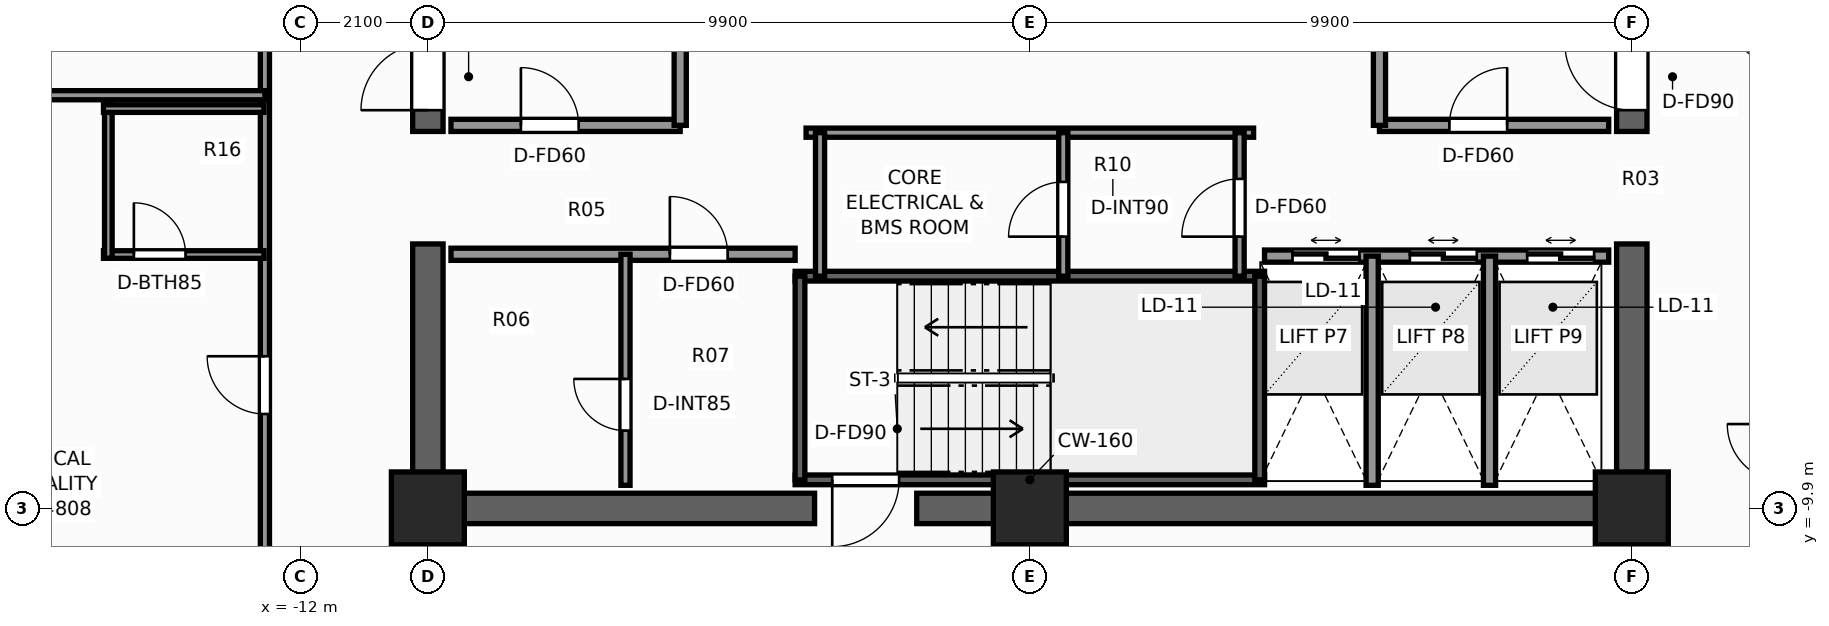
"""IFC4 building model, lengths in metres.
Left out: names, types, materials, properties, quantities, classifications, styles, units other than length and angle.
Written with IfcOpenShell. Run it as: python <this file> out.ifc"""

import sys

from ifc_helpers import new_model, si_unit, direction, frame, frame_2d, origin, origin_2d, place, context, subcontext, project, spatial, rectangle, extrude, element, fill, save


model = new_model("IFC4")
c1 = context("Model", 3, precision=1e-05, world=origin(), true_north=direction((0.0, 1.0)))
c2 = subcontext(c1, "Body", "Model", "MODEL_VIEW")
j1 = project(units=[si_unit("LENGTHUNIT", "METRE"), si_unit("PLANEANGLEUNIT", "RADIAN")], contexts=[c1])
p1 = place(None, origin())
s1 = spatial("IfcSite", under=j1, at=p1, CompositionType="ELEMENT")
p2 = place(p1, origin())
s2 = spatial("IfcBuilding", under=s1, at=p2, CompositionType="ELEMENT")
p3 = place(p2, frame((0.0, 0.0, 166.8)))
s3 = spatial("IfcBuildingStorey", under=s2, at=p3, CompositionType="ELEMENT", Elevation=166.8)
p4 = place(p3, frame((10.15, -9.9, 0.0), z_axis=(0.0, 0.0, 1.0), x_axis=(-1.0, 0.0, 0.0)))
e1 = element("IfcWall", 1, at=p4, inside=s3, PredefinedType="SHEAR", context=c2, shape_type="SweptSolid", body=[
    extrude(rectangle(XDim=12.01, YDim=0.5, at=frame_2d((6.005, 0.0))), origin(), (0.0, 0.0, 1.0), 3.3),
])
p5 = place(p3, frame((-3.54, -9.9, 0.0), z_axis=(0.0, 0.0, 1.0), x_axis=(-1.0, 0.0, 0.0)))
e2 = element("IfcWall", 2, at=p5, inside=s3, PredefinedType="SHEAR", context=c2, shape_type="SweptSolid", body=[
    extrude(rectangle(XDim=6.61, YDim=0.5, at=frame_2d((3.305, 0.0))), origin(), (0.0, 0.0, 1.0), 3.3),
])
for number, where, z_axis, x_axis in (
    (3, (-9.9, -9.65, 0.0), (0.0, 0.0, 1.0), (0.0, 1.0, 0.0)),
    (4, (9.9, -9.65, 0.0), (0.0, 0.0, 1.0), (0.0, 1.0, 0.0)),
):
    element("IfcWall", number, at=place(p3, frame(where, z_axis=z_axis, x_axis=x_axis)), inside=s3, PredefinedType="SHEAR", context=c2, shape_type="SweptSolid", body=[
        extrude(rectangle(XDim=4.1, YDim=0.5, at=frame_2d((2.05, 0.0))), origin(), (0.0, 0.0, 1.0), 3.3),
    ])
p6 = place(p3, frame((-9.9, -3.7, 0.0), z_axis=(0.0, 0.0, 1.0), x_axis=(0.0, 1.0, 0.0)))
e5 = element("IfcWall", 5, at=p6, inside=s3, PredefinedType="SHEAR", context=c2, shape_type="SweptSolid", body=[
    extrude(rectangle(XDim=13.35, YDim=0.5, at=frame_2d((6.675, 0.0))), origin(), (0.0, 0.0, 1.0), 3.3),
])
p7 = place(p6, frame((0.35, 0.0, 0.0)))
e6 = element("IfcOpeningElement", 6, at=p7, cuts=e5, PredefinedType="OPENING", context=c2, shape_type="SweptSolid", body=[
    extrude(rectangle(XDim=1.1, YDim=2.2, at=frame_2d((0.55, 1.1))), frame((0.0, 0.26, 0.0), z_axis=(0.0, -1.0, 0.0), x_axis=(1.0, 0.0, 0.0)), (0.0, 0.0, 1.0), 0.52),
])
p8 = place(p3, frame((9.9, -3.7, 0.0), z_axis=(0.0, 0.0, 1.0), x_axis=(0.0, 1.0, 0.0)))
e7 = element("IfcWall", 7, at=p8, inside=s3, PredefinedType="SHEAR", context=c2, shape_type="SweptSolid", body=[
    extrude(rectangle(XDim=13.35, YDim=0.5, at=frame_2d((6.675, 0.0))), origin(), (0.0, 0.0, 1.0), 3.3),
])
p9 = place(p8, frame((0.35, 0.0, 0.0)))
e8 = element("IfcOpeningElement", 8, at=p9, cuts=e7, PredefinedType="OPENING", context=c2, shape_type="SweptSolid", body=[
    extrude(rectangle(XDim=1.1, YDim=2.2, at=frame_2d((0.55, 1.1))), frame((0.0, 0.26, 0.0), z_axis=(0.0, -1.0, 0.0), x_axis=(1.0, 0.0, 0.0)), (0.0, 0.0, 1.0), 0.52),
])
for number, where, z_axis, x_axis in (
    (9, (-9.9, -9.9, 0.0), (0.0, 0.0, 1.0), (1.0, 0.0, 0.0)),
    (10, (9.9, -9.9, 0.0), (0.0, 0.0, 1.0), (1.0, 0.0, 0.0)),
    (11, (0.0, -9.9, 0.0), (0.0, 0.0, 1.0), (1.0, 0.0, 0.0)),
):
    element("IfcColumn", number, at=place(p3, frame(where, z_axis=z_axis, x_axis=x_axis)), inside=s3, PredefinedType="COLUMN", context=c2, shape_type="SweptSolid", body=[
        extrude(rectangle(XDim=1.2, YDim=1.2, at=origin_2d()), origin(), (0.0, 0.0, 1.0), 3.3),
    ])
p10 = place(p3, frame((3.86, -9.43, 0.0), z_axis=(0.0, 0.0, 1.0), x_axis=(-1.0, 0.0, 0.0)))
e12 = element("IfcWall", 12, at=p10, inside=s3, PredefinedType="SHEAR", context=c2, shape_type="SweptSolid", body=[
    extrude(rectangle(XDim=7.72, YDim=0.16, at=frame_2d((3.86, 0.0))), origin(), (0.0, 0.0, 1.0), 3.3),
])
p11 = place(p10, frame((6.01, 0.0, 0.0)))
e13 = element("IfcOpeningElement", 13, at=p11, cuts=e12, PredefinedType="OPENING", context=c2, shape_type="SweptSolid", body=[
    extrude(rectangle(XDim=1.1, YDim=2.2, at=frame_2d((0.55, 1.1))), frame((0.0, 0.09, 0.0), z_axis=(0.0, -1.0, 0.0), x_axis=(1.0, 0.0, 0.0)), (0.0, 0.0, 1.0), 0.18),
])
p12 = place(p3, frame((-3.86, -6.08, 0.0), z_axis=(0.0, 0.0, 1.0), x_axis=(1.0, 0.0, 0.0)))
e14 = element("IfcWall", 14, at=p12, inside=s3, PredefinedType="SHEAR", context=c2, shape_type="SweptSolid", body=[
    extrude(rectangle(XDim=7.72, YDim=0.16, at=frame_2d((3.86, 0.0))), origin(), (0.0, 0.0, 1.0), 3.3),
])
for number, where, z_axis, x_axis in (
    (15, (-3.78, -9.43, 0.0), (0.0, 0.0, 1.0), (0.0, 1.0, 0.0)),
    (16, (3.78, -9.43, 0.0), (0.0, 0.0, 1.0), (0.0, 1.0, 0.0)),
):
    element("IfcWall", number, at=place(p3, frame(where, z_axis=z_axis, x_axis=x_axis)), inside=s3, PredefinedType="SHEAR", context=c2, shape_type="SweptSolid", body=[
        extrude(rectangle(XDim=3.35, YDim=0.16, at=frame_2d((1.675, 0.0))), origin(), (0.0, 0.0, 1.0), 3.3),
    ])
p13 = place(p3, frame((-9.52, -3.6, 0.0), z_axis=(0.0, 0.0, 1.0), x_axis=(1.0, 0.0, 0.0)))
e17 = element("IfcWall", 17, at=p13, inside=s3, PredefinedType="SOLIDWALL", context=c2, shape_type="SweptSolid", body=[
    extrude(rectangle(XDim=3.77, YDim=0.2, at=frame_2d((1.885, 0.0))), origin(), (0.0, 0.0, 1.0), 3.1),
])
p14 = place(p13, frame((1.15, 0.0, 0.0)))
e18 = element("IfcOpeningElement", 18, at=p14, cuts=e17, PredefinedType="OPENING", context=c2, shape_type="SweptSolid", body=[
    extrude(rectangle(XDim=0.95, YDim=2.06, at=frame_2d((0.475, 1.03))), frame((0.0, 0.11, 0.0), z_axis=(0.0, -1.0, 0.0), x_axis=(1.0, 0.0, 0.0)), (0.0, 0.0, 1.0), 0.22),
])
p15 = place(p3, frame((-5.75, -3.6, 0.0), z_axis=(0.0, 0.0, 1.0), x_axis=(0.0, 1.0, 0.0)))
e19 = element("IfcWall", 19, at=p15, inside=s3, PredefinedType="SOLIDWALL", context=c2, shape_type="SweptSolid", body=[
    extrude(rectangle(XDim=5.57, YDim=0.2, at=frame_2d((2.785, 0.0))), origin(), (0.0, 0.0, 1.0), 2.735),
])
p16 = place(p15, frame((2.75, 0.0, 0.0)))
e20 = element("IfcOpeningElement", 20, at=p16, cuts=e19, PredefinedType="OPENING", context=c2, shape_type="SweptSolid", body=[
    extrude(rectangle(XDim=1.1, YDim=2.2, at=frame_2d((0.55, 1.1))), frame((0.0, 0.11, 0.0), z_axis=(0.0, -1.0, 0.0), x_axis=(1.0, 0.0, 0.0)), (0.0, 0.0, 1.0), 0.22),
])
p17 = place(p3, frame((5.75, -3.6, 0.0), z_axis=(0.0, 0.0, 1.0), x_axis=(1.0, 0.0, 0.0)))
e21 = element("IfcWall", 21, at=p17, inside=s3, PredefinedType="SOLIDWALL", context=c2, shape_type="SweptSolid", body=[
    extrude(rectangle(XDim=3.77, YDim=0.2, at=frame_2d((1.885, 0.0))), origin(), (0.0, 0.0, 1.0), 3.1),
])
p18 = place(p17, frame((1.15, 0.0, 0.0)))
e22 = element("IfcOpeningElement", 22, at=p18, cuts=e21, PredefinedType="OPENING", context=c2, shape_type="SweptSolid", body=[
    extrude(rectangle(XDim=0.95, YDim=2.06, at=frame_2d((0.475, 1.03))), frame((0.0, 0.11, 0.0), z_axis=(0.0, -1.0, 0.0), x_axis=(1.0, 0.0, 0.0)), (0.0, 0.0, 1.0), 0.22),
])
p19 = place(p3, frame((5.75, -3.6, 0.0), z_axis=(0.0, 0.0, 1.0), x_axis=(0.0, 1.0, 0.0)))
e23 = element("IfcWall", 23, at=p19, inside=s3, PredefinedType="SOLIDWALL", context=c2, shape_type="SweptSolid", body=[
    extrude(rectangle(XDim=5.57, YDim=0.2, at=frame_2d((2.785, 0.0))), origin(), (0.0, 0.0, 1.0), 2.735),
])
p20 = place(p19, frame((2.75, 0.0, 0.0)))
e24 = element("IfcOpeningElement", 24, at=p20, cuts=e23, PredefinedType="OPENING", context=c2, shape_type="SweptSolid", body=[
    extrude(rectangle(XDim=1.1, YDim=2.2, at=frame_2d((0.55, 1.1))), frame((0.0, 0.11, 0.0), z_axis=(0.0, -1.0, 0.0), x_axis=(1.0, 0.0, 0.0)), (0.0, 0.0, 1.0), 0.22),
])
p21 = place(p3, frame((-9.52, -5.72, 0.0), z_axis=(0.0, 0.0, 1.0), x_axis=(1.0, 0.0, 0.0)))
e25 = element("IfcWall", 25, at=p21, inside=s3, PredefinedType="SOLIDWALL", context=c2, shape_type="SweptSolid", body=[
    extrude(rectangle(XDim=5.66, YDim=0.2, at=frame_2d((2.83, 0.0))), origin(), (0.0, 0.0, 1.0), 3.1),
])
p22 = place(p21, frame((3.6, 0.0, 0.0)))
e26 = element("IfcOpeningElement", 26, at=p22, cuts=e25, PredefinedType="OPENING", context=c2, shape_type="SweptSolid", body=[
    extrude(rectangle(XDim=0.95, YDim=2.06, at=frame_2d((0.475, 1.03))), frame((0.0, 0.11, 0.0), z_axis=(0.0, -1.0, 0.0), x_axis=(1.0, 0.0, 0.0)), (0.0, 0.0, 1.0), 0.22),
])
p23 = place(p3, frame((-6.65, -9.52, 0.0), z_axis=(0.0, 0.0, 1.0), x_axis=(0.0, 1.0, 0.0)))
e27 = element("IfcWall", 27, at=p23, inside=s3, PredefinedType="PARTITIONING", context=c2, shape_type="SweptSolid", body=[
    extrude(rectangle(XDim=3.8, YDim=0.15, at=frame_2d((1.9, 0.0))), origin(), (0.0, 0.0, 1.0), 3.1),
])
p24 = place(p23, frame((0.9, 0.0, 0.0)))
e28 = element("IfcOpeningElement", 28, at=p24, cuts=e27, PredefinedType="OPENING", context=c2, shape_type="SweptSolid", body=[
    extrude(rectangle(XDim=0.85, YDim=2.03, at=frame_2d((0.425, 1.015))), frame((0.0, 0.085, 0.0), z_axis=(0.0, -1.0, 0.0), x_axis=(1.0, 0.0, 0.0)), (0.0, 0.0, 1.0), 0.17),
])
p25 = place(p3, frame((3.86, -5.75, 0.0), z_axis=(0.0, 0.0, 1.0), x_axis=(1.0, 0.0, 0.0)))
e29 = element("IfcWall", 29, at=p25, inside=s3, PredefinedType="SOLIDWALL", context=c2, shape_type="SweptSolid", body=[
    extrude(rectangle(XDim=5.66, YDim=0.2, at=frame_2d((2.83, 0.0))), origin(), (0.0, 0.0, 1.0), 3.1),
])
p26 = place(p25, frame((0.46, 0.0, 0.0)))
e30 = element("IfcOpeningElement", 30, at=p26, cuts=e29, PredefinedType="OPENING", context=c2, shape_type="SweptSolid", body=[
    extrude(rectangle(XDim=1.1, YDim=2.2, at=frame_2d((0.55, 1.1))), frame((0.0, 0.11, 0.0), z_axis=(0.0, -1.0, 0.0), x_axis=(1.0, 0.0, 0.0)), (0.0, 0.0, 1.0), 0.22),
])
p27 = place(p25, frame((2.39, 0.0, 0.0)))
e31 = element("IfcOpeningElement", 31, at=p27, cuts=e29, PredefinedType="OPENING", context=c2, shape_type="SweptSolid", body=[
    extrude(rectangle(XDim=1.1, YDim=2.2, at=frame_2d((0.55, 1.1))), frame((0.0, 0.11, 0.0), z_axis=(0.0, -1.0, 0.0), x_axis=(1.0, 0.0, 0.0)), (0.0, 0.0, 1.0), 0.22),
])
p28 = place(p25, frame((4.32, 0.0, 0.0)))
e32 = element("IfcOpeningElement", 32, at=p28, cuts=e29, PredefinedType="OPENING", context=c2, shape_type="SweptSolid", body=[
    extrude(rectangle(XDim=1.1, YDim=2.2, at=frame_2d((0.55, 1.1))), frame((0.0, 0.11, 0.0), z_axis=(0.0, -1.0, 0.0), x_axis=(1.0, 0.0, 0.0)), (0.0, 0.0, 1.0), 0.22),
])
for number, where, z_axis, x_axis in (
    (33, (5.63, -9.52, 0.0), (0.0, 0.0, 1.0), (0.0, 1.0, 0.0)),
    (34, (7.56, -9.52, 0.0), (0.0, 0.0, 1.0), (0.0, 1.0, 0.0)),
):
    element("IfcWall", number, at=place(p3, frame(where, z_axis=z_axis, x_axis=x_axis)), inside=s3, PredefinedType="SOLIDWALL", context=c2, shape_type="SweptSolid", body=[
        extrude(rectangle(XDim=3.77, YDim=0.2, at=frame_2d((1.885, 0.0))), origin(), (0.0, 0.0, 1.0), 3.1),
    ])
p29 = place(p3, frame((-3.68, -3.72, 0.0), z_axis=(0.0, 0.0, 1.0), x_axis=(1.0, 0.0, 0.0)))
e35 = element("IfcWall", 35, at=p29, inside=s3, PredefinedType="PARTITIONING", context=c2, shape_type="SweptSolid", body=[
    extrude(rectangle(XDim=7.36, YDim=0.15, at=frame_2d((3.68, 0.0))), origin(), (0.0, 0.0, 1.0), 3.1),
])
p30 = place(p3, frame((3.45, -6.08, 0.0), z_axis=(0.0, 0.0, 1.0), x_axis=(0.0, 1.0, 0.0)))
e36 = element("IfcWall", 36, at=p30, inside=s3, PredefinedType="PARTITIONING", context=c2, shape_type="SweptSolid", body=[
    extrude(rectangle(XDim=2.36, YDim=0.15, at=frame_2d((1.18, 0.0))), origin(), (0.0, 0.0, 1.0), 3.1),
])
p31 = place(p30, frame((0.65, 0.0, 0.0)))
e37 = element("IfcOpeningElement", 37, at=p31, cuts=e36, PredefinedType="OPENING", context=c2, shape_type="SweptSolid", body=[
    extrude(rectangle(XDim=0.95, YDim=2.06, at=frame_2d((0.475, 1.03))), frame((0.0, 0.085, 0.0), z_axis=(0.0, -1.0, 0.0), x_axis=(1.0, 0.0, 0.0)), (0.0, 0.0, 1.0), 0.17),
])
p32 = place(p3, frame((-3.45, -6.08, 0.0), z_axis=(0.0, 0.0, 1.0), x_axis=(0.0, 1.0, 0.0)))
e38 = element("IfcWall", 38, at=p32, inside=s3, PredefinedType="PARTITIONING", context=c2, shape_type="SweptSolid", body=[
    extrude(rectangle(XDim=2.36, YDim=0.15, at=frame_2d((1.18, 0.0))), origin(), (0.0, 0.0, 1.0), 3.1),
])
p33 = place(p3, frame((0.55, -6.08, 0.0), z_axis=(0.0, 0.0, 1.0), x_axis=(0.0, 1.0, 0.0)))
e39 = element("IfcWall", 39, at=p33, inside=s3, PredefinedType="PARTITIONING", context=c2, shape_type="SweptSolid", body=[
    extrude(rectangle(XDim=2.36, YDim=0.15, at=frame_2d((1.18, 0.0))), origin(), (0.0, 0.0, 1.0), 3.1),
])
p34 = place(p33, frame((0.65, 0.0, 0.0)))
e40 = element("IfcOpeningElement", 40, at=p34, cuts=e39, PredefinedType="OPENING", context=c2, shape_type="SweptSolid", body=[
    extrude(rectangle(XDim=0.9, YDim=2.06, at=frame_2d((0.45, 1.03))), frame((0.0, 0.085, 0.0), z_axis=(0.0, -1.0, 0.0), x_axis=(1.0, 0.0, 0.0)), (0.0, 0.0, 1.0), 0.17),
])
p35 = place(p3, frame((-12.58, -12.26, 0.0), z_axis=(0.0, 0.0, 1.0), x_axis=(0.0, 1.0, 0.0)))
e41 = element("IfcWall", 41, at=p35, inside=s3, PredefinedType="PARTITIONING", context=c2, shape_type="SweptSolid", body=[
    extrude(rectangle(XDim=24.84, YDim=0.15, at=frame_2d((12.42, 0.0))), origin(), (0.0, 0.0, 1.0), 2.389),
])
p36 = place(p35, frame((3.913, 0.0, 0.0)))
e42 = element("IfcOpeningElement", 42, at=p36, cuts=e41, PredefinedType="OPENING", context=c2, shape_type="SweptSolid", body=[
    extrude(rectangle(XDim=0.95, YDim=2.06, at=frame_2d((0.475, 1.03))), frame((0.0, 0.085, 0.0), z_axis=(0.0, -1.0, 0.0), x_axis=(1.0, 0.0, 0.0)), (0.0, 0.0, 1.0), 0.17),
])
p37 = place(p35, frame((19.345, 0.0, 0.0)))
e43 = element("IfcOpeningElement", 43, at=p37, cuts=e41, PredefinedType="OPENING", context=c2, shape_type="SweptSolid", body=[
    extrude(rectangle(XDim=0.9, YDim=2.06, at=frame_2d((0.45, 1.03))), frame((0.0, 0.085, 0.0), z_axis=(0.0, -1.0, 0.0), x_axis=(1.0, 0.0, 0.0)), (0.0, 0.0, 1.0), 0.17),
])
p38 = place(p3, frame((-19.08, -3.104, 0.0), z_axis=(0.0, 0.0, 1.0), x_axis=(1.0, 0.0, 0.0)))
e44 = element("IfcWall", 44, at=p38, inside=s3, PredefinedType="PARTITIONING", context=c2, shape_type="SweptSolid", body=[
    extrude(rectangle(XDim=6.5, YDim=0.15, at=frame_2d((3.25, 0.0))), origin(), (0.0, 0.0, 1.0), 2.473),
])
p39 = place(p3, frame((-15.235, -5.724, 0.0), z_axis=(0.0, 0.0, 1.0), x_axis=(1.0, 0.0, 0.0)))
e45 = element("IfcWall", 45, at=p39, inside=s3, PredefinedType="PARTITIONING", context=c2, shape_type="SweptSolid", body=[
    extrude(rectangle(XDim=2.64, YDim=0.125, at=frame_2d((1.32, 0.0))), origin(), (0.0, 0.0, 1.0), 3.1),
])
p40 = place(p39, frame((0.5, 0.0, 0.0)))
e46 = element("IfcOpeningElement", 46, at=p40, cuts=e45, PredefinedType="OPENING", context=c2, shape_type="SweptSolid", body=[
    extrude(rectangle(XDim=0.85, YDim=2.03, at=frame_2d((0.425, 1.015))), frame((0.0, 0.073, 0.0), z_axis=(0.0, -1.0, 0.0), x_axis=(1.0, 0.0, 0.0)), (0.0, 0.0, 1.0), 0.145),
])
p41 = place(p3, frame((-15.155, -5.784, 0.0), z_axis=(0.0, 0.0, 1.0), x_axis=(0.0, 1.0, 0.0)))
e47 = element("IfcWall", 47, at=p41, inside=s3, PredefinedType="PARTITIONING", context=c2, shape_type="SweptSolid", body=[
    extrude(rectangle(XDim=2.52, YDim=0.125, at=frame_2d((1.26, 0.0))), origin(), (0.0, 0.0, 1.0), 2.389),
])
p42 = place(p3, frame((-15.235, -3.324, 0.0), z_axis=(0.0, 0.0, 1.0), x_axis=(1.0, 0.0, 0.0)))
e48 = element("IfcWall", 48, at=p42, inside=s3, PredefinedType="PARTITIONING", context=c2, shape_type="SweptSolid", body=[
    extrude(rectangle(XDim=2.64, YDim=0.125, at=frame_2d((1.32, 0.0))), origin(), (0.0, 0.0, 1.0), 3.1),
])
p43 = place(p11, origin())
e49 = element("IfcDoor", 49, at=p43, inside=s3, OperationType="SINGLE_SWING_RIGHT", PredefinedType="DOOR", context=c2, shape_type="SweptSolid", body=[
    extrude(rectangle(XDim=1.1, YDim=2.2, at=frame_2d((0.55, 1.1))), frame((0.0, 0.025, 0.0), z_axis=(0.0, -1.0, 0.0), x_axis=(1.0, 0.0, 0.0)), (0.0, 0.0, 1.0), 0.05),
])
fill(e13, e49)
p44 = place(p7, origin())
e50 = element("IfcDoor", 50, at=p44, inside=s3, OperationType="SINGLE_SWING_LEFT", PredefinedType="DOOR", context=c2, shape_type="SweptSolid", body=[
    extrude(rectangle(XDim=1.1, YDim=2.2, at=frame_2d((0.55, 1.1))), frame((0.0, 0.025, 0.0), z_axis=(0.0, -1.0, 0.0), x_axis=(1.0, 0.0, 0.0)), (0.0, 0.0, 1.0), 0.05),
])
fill(e6, e50)
p45 = place(p9, origin())
e51 = element("IfcDoor", 51, at=p45, inside=s3, OperationType="SINGLE_SWING_RIGHT", PredefinedType="DOOR", context=c2, shape_type="SweptSolid", body=[
    extrude(rectangle(XDim=1.1, YDim=2.2, at=frame_2d((0.55, 1.1))), frame((0.0, 0.025, 0.0), z_axis=(0.0, -1.0, 0.0), x_axis=(1.0, 0.0, 0.0)), (0.0, 0.0, 1.0), 0.05),
])
fill(e8, e51)
p46 = place(p22, origin())
e52 = element("IfcDoor", 52, at=p46, inside=s3, OperationType="SINGLE_SWING_LEFT", PredefinedType="DOOR", context=c2, shape_type="SweptSolid", body=[
    extrude(rectangle(XDim=0.95, YDim=2.06, at=frame_2d((0.475, 1.03))), frame((0.0, 0.025, 0.0), z_axis=(0.0, -1.0, 0.0), x_axis=(1.0, 0.0, 0.0)), (0.0, 0.0, 1.0), 0.05),
])
fill(e26, e52)
p47 = place(p24, origin())
e53 = element("IfcDoor", 53, at=p47, inside=s3, OperationType="SINGLE_SWING_RIGHT", PredefinedType="DOOR", context=c2, shape_type="SweptSolid", body=[
    extrude(rectangle(XDim=0.85, YDim=2.03, at=frame_2d((0.425, 1.015))), frame((0.0, 0.025, 0.0), z_axis=(0.0, -1.0, 0.0), x_axis=(1.0, 0.0, 0.0)), (0.0, 0.0, 1.0), 0.05),
])
fill(e28, e53)
p48 = place(p14, origin())
e54 = element("IfcDoor", 54, at=p48, inside=s3, OperationType="SINGLE_SWING_LEFT", PredefinedType="DOOR", context=c2, shape_type="SweptSolid", body=[
    extrude(rectangle(XDim=0.95, YDim=2.06, at=frame_2d((0.475, 1.03))), frame((0.0, 0.025, 0.0), z_axis=(0.0, -1.0, 0.0), x_axis=(1.0, 0.0, 0.0)), (0.0, 0.0, 1.0), 0.05),
])
fill(e18, e54)
p49 = place(p26, origin())
e55 = element("IfcDoor", 55, at=p49, inside=s3, OperationType="DOUBLE_DOOR_SLIDING", PredefinedType="DOOR", context=c2, shape_type="SweptSolid", body=[
    extrude(rectangle(XDim=1.1, YDim=2.2, at=frame_2d((0.55, 1.1))), frame((0.0, 0.025, 0.0), z_axis=(0.0, -1.0, 0.0), x_axis=(1.0, 0.0, 0.0)), (0.0, 0.0, 1.0), 0.05),
])
fill(e30, e55)
p50 = place(p27, origin())
e56 = element("IfcDoor", 56, at=p50, inside=s3, OperationType="DOUBLE_DOOR_SLIDING", PredefinedType="DOOR", context=c2, shape_type="SweptSolid", body=[
    extrude(rectangle(XDim=1.1, YDim=2.2, at=frame_2d((0.55, 1.1))), frame((0.0, 0.025, 0.0), z_axis=(0.0, -1.0, 0.0), x_axis=(1.0, 0.0, 0.0)), (0.0, 0.0, 1.0), 0.05),
])
fill(e31, e56)
p51 = place(p28, origin())
e57 = element("IfcDoor", 57, at=p51, inside=s3, OperationType="DOUBLE_DOOR_SLIDING", PredefinedType="DOOR", context=c2, shape_type="SweptSolid", body=[
    extrude(rectangle(XDim=1.1, YDim=2.2, at=frame_2d((0.55, 1.1))), frame((0.0, 0.025, 0.0), z_axis=(0.0, -1.0, 0.0), x_axis=(1.0, 0.0, 0.0)), (0.0, 0.0, 1.0), 0.05),
])
fill(e32, e57)
p52 = place(p18, origin())
e58 = element("IfcDoor", 58, at=p52, inside=s3, OperationType="SINGLE_SWING_RIGHT", PredefinedType="DOOR", context=c2, shape_type="SweptSolid", body=[
    extrude(rectangle(XDim=0.95, YDim=2.06, at=frame_2d((0.475, 1.03))), frame((0.0, 0.025, 0.0), z_axis=(0.0, -1.0, 0.0), x_axis=(1.0, 0.0, 0.0)), (0.0, 0.0, 1.0), 0.05),
])
fill(e22, e58)
p53 = place(p31, origin())
e59 = element("IfcDoor", 59, at=p53, inside=s3, OperationType="SINGLE_SWING_LEFT", PredefinedType="DOOR", context=c2, shape_type="SweptSolid", body=[
    extrude(rectangle(XDim=0.95, YDim=2.06, at=frame_2d((0.475, 1.03))), frame((0.0, 0.025, 0.0), z_axis=(0.0, -1.0, 0.0), x_axis=(1.0, 0.0, 0.0)), (0.0, 0.0, 1.0), 0.05),
])
fill(e37, e59)
p54 = place(p34, origin())
e60 = element("IfcDoor", 60, at=p54, inside=s3, OperationType="SINGLE_SWING_LEFT", PredefinedType="DOOR", context=c2, shape_type="SweptSolid", body=[
    extrude(rectangle(XDim=0.9, YDim=2.06, at=frame_2d((0.45, 1.03))), frame((0.0, 0.025, 0.0), z_axis=(0.0, -1.0, 0.0), x_axis=(1.0, 0.0, 0.0)), (0.0, 0.0, 1.0), 0.05),
])
fill(e40, e60)
p55 = place(p40, origin())
e61 = element("IfcDoor", 61, at=p55, inside=s3, OperationType="SINGLE_SWING_LEFT", PredefinedType="DOOR", context=c2, shape_type="SweptSolid", body=[
    extrude(rectangle(XDim=0.85, YDim=2.03, at=frame_2d((0.425, 1.015))), frame((0.0, 0.025, 0.0), z_axis=(0.0, -1.0, 0.0), x_axis=(1.0, 0.0, 0.0)), (0.0, 0.0, 1.0), 0.05),
])
fill(e46, e61)
p56 = place(p36, origin())
e62 = element("IfcDoor", 62, at=p56, inside=s3, OperationType="SINGLE_SWING_RIGHT", PredefinedType="DOOR", context=c2, shape_type="SweptSolid", body=[
    extrude(rectangle(XDim=0.95, YDim=2.06, at=frame_2d((0.475, 1.03))), frame((0.0, 0.025, 0.0), z_axis=(0.0, -1.0, 0.0), x_axis=(1.0, 0.0, 0.0)), (0.0, 0.0, 1.0), 0.05),
])
fill(e42, e62)
save(model, sys.argv[1])
